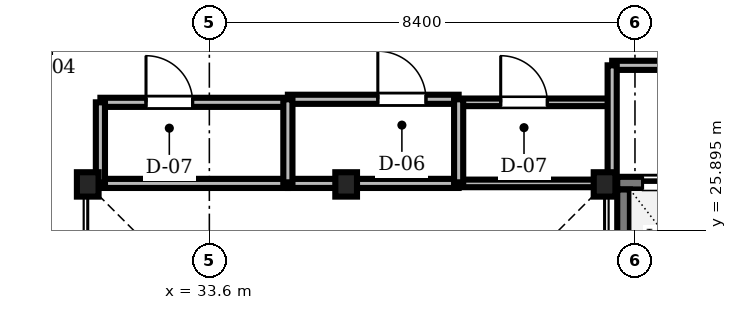
"""IFC4 building model, lengths in metres.
Left out: names, types, materials, properties, quantities, classifications, styles, units other than length and angle.
Written with IfcOpenShell. Run it as: python <this file> out.ifc"""

import sys

from ifc_helpers import new_model, si_unit, direction, frame, frame_2d, origin, origin_2d, place, context, subcontext, project, spatial, rectangle, i_section, extrude, source, transform, mapped, element, fill, save


model = new_model("IFC4")
c1 = context("Model", 3, precision=1e-05, world=origin(), true_north=direction((0.0, 1.0)))
c2 = subcontext(c1, "Body", "Model", "MODEL_VIEW")
j1 = project(units=[si_unit("LENGTHUNIT", "METRE"), si_unit("PLANEANGLEUNIT", "RADIAN")], contexts=[c1])
p1 = place(None, origin())
s1 = spatial("IfcSite", under=j1, at=p1, CompositionType="ELEMENT")
p2 = place(p1, origin())
s2 = spatial("IfcBuilding", under=s1, at=p2, CompositionType="ELEMENT")
p3 = place(p2, frame((0.0, 0.0, 67.75)))
s3 = spatial("IfcBuildingStorey", under=s2, at=p3, CompositionType="ELEMENT", Elevation=67.75)
m1 = source(origin(), c2, "Body", "SweptSolid", [
    extrude(i_section(OverallWidth=0.428, OverallDepth=0.481, WebThickness=0.04, FlangeThickness=0.063, FilletRadius=0.015, at=origin_2d()), origin(), (0.0, 0.0, 1.0), 3.41),
])
for number, where, z_axis, x_axis in (
    (1, (41.4, 26.8, 0.0), (0.0, 0.0, 1.0), (1.0, 0.0, 0.0)),
    (2, (36.3, 26.8, 0.0), (0.0, 0.0, 1.0), (1.0, 0.0, 0.0)),
    (3, (31.2, 26.8, 0.0), (0.0, 0.0, 1.0), (1.0, 0.0, 0.0)),
):
    element("IfcColumn", number, at=place(p3, frame(where, z_axis=z_axis, x_axis=x_axis)), inside=s3, PredefinedType="COLUMN", context=c2, shape_type="MappedRepresentation", body=[
        mapped(m1, transform((0.0, 0.0, 0.0), scale=1.0)),
    ])
m2 = source(origin(), c2, "Body", "SweptSolid", [
    extrude(rectangle(XDim=2.3, YDim=0.25, at=frame_2d((1.15, 0.0))), origin(), (0.0, 0.0, 1.0), 3.41),
])
p4 = place(p3, frame((41.65, 26.825, 0.0), z_axis=(0.0, 0.0, 1.0), x_axis=(1.0, 0.0, 0.0)))
e4 = element("IfcWall", 4, at=p4, inside=s3, PredefinedType="SOLIDWALL", context=c2, shape_type="MappedRepresentation", body=[
    mapped(m2, transform((0.0, 0.0, 0.0), scale=1.0)),
])
m3 = source(origin(), c2, "Body", "SweptSolid", [
    extrude(rectangle(XDim=1.3, YDim=2.3, at=frame_2d((0.65, 1.15))), frame((0.0, 0.135, 0.0), z_axis=(0.0, -1.0, 0.0), x_axis=(1.0, 0.0, 0.0)), (0.0, 0.0, 1.0), 0.27),
])
p5 = place(p4, frame((0.5, 0.0, 0.0)))
e5 = element("IfcOpeningElement", 5, at=p5, cuts=e4, PredefinedType="OPENING", context=c2, shape_type="MappedRepresentation", body=[
    mapped(m3, transform((0.0, 0.0, 0.0), scale=1.0)),
])
p6 = place(p3, frame((41.775, 24.4, 0.0), z_axis=(0.0, 0.0, 1.0), x_axis=(0.0, 1.0, 0.0)))
e6 = element("IfcWall", 6, at=p6, inside=s3, PredefinedType="SOLIDWALL", context=c2, shape_type="MappedRepresentation", body=[
    mapped(m2, transform((0.0, 0.0, 0.0), scale=1.0)),
])
m4 = source(origin(), c2, "Body", "SweptSolid", [
    extrude(rectangle(XDim=4.448, YDim=0.18, at=frame_2d((2.224, 0.0))), origin(), (0.0, 0.0, 1.0), 3.042),
])
p7 = place(p3, frame((41.55, 29.15, 0.0), z_axis=(0.0, 0.0, 1.0), x_axis=(1.0, 0.0, 0.0)))
e7 = element("IfcWall", 7, at=p7, inside=s3, PredefinedType="PARTITIONING", context=c2, shape_type="MappedRepresentation", body=[
    mapped(m4, transform((0.0, 0.0, 0.0), scale=1.0)),
])
m5 = source(origin(), c2, "Body", "SweptSolid", [
    extrude(rectangle(XDim=1.2, YDim=2.2, at=frame_2d((0.6, 1.1))), frame((0.0, 0.1, 0.0), z_axis=(0.0, -1.0, 0.0), x_axis=(1.0, 0.0, 0.0)), (0.0, 0.0, 1.0), 0.2),
])
p8 = place(p7, frame((1.6, 0.0, 0.0)))
e8 = element("IfcOpeningElement", 8, at=p8, cuts=e7, PredefinedType="OPENING", context=c2, shape_type="MappedRepresentation", body=[
    mapped(m5, transform((0.0, 0.0, 0.0), scale=1.0)),
])
m6 = source(origin(), c2, "Body", "SweptSolid", [
    extrude(rectangle(XDim=3.7, YDim=0.18, at=frame_2d((1.85, 0.0))), origin(), (0.0, 0.0, 1.0), 3.042),
])
p9 = place(p3, frame((31.45, 28.42, 0.0), z_axis=(0.0, 0.0, 1.0), x_axis=(1.0, 0.0, 0.0)))
e9 = element("IfcWall", 9, at=p9, inside=s3, PredefinedType="PARTITIONING", context=c2, shape_type="MappedRepresentation", body=[
    mapped(m6, transform((0.0, 0.0, 0.0), scale=1.0)),
])
m7 = source(origin(), c2, "Body", "SweptSolid", [
    extrude(rectangle(XDim=0.92, YDim=2.1, at=frame_2d((0.46, 1.05))), frame((0.0, 0.1, 0.0), z_axis=(0.0, -1.0, 0.0), x_axis=(1.0, 0.0, 0.0)), (0.0, 0.0, 1.0), 0.2),
])
p10 = place(p9, frame((0.9, 0.0, 0.0)))
e10 = element("IfcOpeningElement", 10, at=p10, cuts=e9, PredefinedType="OPENING", context=c2, shape_type="MappedRepresentation", body=[
    mapped(m7, transform((0.0, 0.0, 0.0), scale=1.0)),
])
m8 = source(origin(), c2, "Body", "SweptSolid", [
    extrude(rectangle(XDim=3.37, YDim=0.18, at=frame_2d((1.685, 0.0))), origin(), (0.0, 0.0, 1.0), 3.41),
])
p11 = place(p3, frame((35.15, 28.48, 0.0), z_axis=(0.0, 0.0, 1.0), x_axis=(1.0, 0.0, 0.0)))
e11 = element("IfcWall", 11, at=p11, inside=s3, PredefinedType="PARTITIONING", context=c2, shape_type="MappedRepresentation", body=[
    mapped(m8, transform((0.0, 0.0, 0.0), scale=1.0)),
])
m9 = source(origin(), c2, "Body", "SweptSolid", [
    extrude(rectangle(XDim=0.95, YDim=2.15, at=frame_2d((0.475, 1.075))), frame((0.0, 0.1, 0.0), z_axis=(0.0, -1.0, 0.0), x_axis=(1.0, 0.0, 0.0)), (0.0, 0.0, 1.0), 0.2),
])
p12 = place(p11, frame((1.775, 0.0, 0.0)))
e12 = element("IfcOpeningElement", 12, at=p12, cuts=e11, PredefinedType="OPENING", context=c2, shape_type="MappedRepresentation", body=[
    mapped(m9, transform((0.0, 0.0, 0.0), scale=1.0)),
])
m10 = source(origin(), c2, "Body", "SweptSolid", [
    extrude(rectangle(XDim=3.0, YDim=0.15, at=frame_2d((1.5, 0.0))), origin(), (0.0, 0.0, 1.0), 3.41),
])
p13 = place(p3, frame((38.52, 28.42, 0.0), z_axis=(0.0, 0.0, 1.0), x_axis=(1.0, 0.0, 0.0)))
e13 = element("IfcWall", 13, at=p13, inside=s3, PredefinedType="PARTITIONING", context=c2, shape_type="MappedRepresentation", body=[
    mapped(m10, transform((0.0, 0.0, 0.0), scale=1.0)),
])
m11 = source(origin(), c2, "Body", "SweptSolid", [
    extrude(rectangle(XDim=0.92, YDim=2.1, at=frame_2d((0.46, 1.05))), frame((0.0, 0.085, 0.0), z_axis=(0.0, -1.0, 0.0), x_axis=(1.0, 0.0, 0.0)), (0.0, 0.0, 1.0), 0.17),
])
p14 = place(p13, frame((0.83, 0.0, 0.0)))
e14 = element("IfcOpeningElement", 14, at=p14, cuts=e13, PredefinedType="OPENING", context=c2, shape_type="MappedRepresentation", body=[
    mapped(m11, transform((0.0, 0.0, 0.0), scale=1.0)),
])
m12 = source(origin(), c2, "Body", "SweptSolid", [
    extrude(rectangle(XDim=3.7, YDim=0.18, at=frame_2d((1.85, 0.0))), origin(), (0.0, 0.0, 1.0), 2.952),
])
p15 = place(p3, frame((31.45, 26.82, 0.0), z_axis=(0.0, 0.0, 1.0), x_axis=(1.0, 0.0, 0.0)))
e15 = element("IfcWall", 15, at=p15, inside=s3, PredefinedType="PARTITIONING", context=c2, shape_type="MappedRepresentation", body=[
    mapped(m12, transform((0.0, 0.0, 0.0), scale=1.0)),
])
m13 = source(origin(), c2, "Body", "SweptSolid", [
    extrude(rectangle(XDim=3.37, YDim=0.18, at=frame_2d((1.685, 0.0))), origin(), (0.0, 0.0, 1.0), 2.952),
])
p16 = place(p3, frame((35.15, 26.82, 0.0), z_axis=(0.0, 0.0, 1.0), x_axis=(1.0, 0.0, 0.0)))
e16 = element("IfcWall", 16, at=p16, inside=s3, PredefinedType="PARTITIONING", context=c2, shape_type="MappedRepresentation", body=[
    mapped(m13, transform((0.0, 0.0, 0.0), scale=1.0)),
])
m14 = source(origin(), c2, "Body", "SweptSolid", [
    extrude(rectangle(XDim=3.0, YDim=0.15, at=frame_2d((1.5, 0.0))), origin(), (0.0, 0.0, 1.0), 2.802),
])
p17 = place(p3, frame((38.52, 26.82, 0.0), z_axis=(0.0, 0.0, 1.0), x_axis=(1.0, 0.0, 0.0)))
e17 = element("IfcWall", 17, at=p17, inside=s3, PredefinedType="PARTITIONING", context=c2, shape_type="MappedRepresentation", body=[
    mapped(m14, transform((0.0, 0.0, 0.0), scale=1.0)),
])
m15 = source(origin(), c2, "Body", "SweptSolid", [
    extrude(rectangle(XDim=2.35, YDim=0.18, at=frame_2d((1.175, 0.0))), origin(), (0.0, 0.0, 1.0), 2.802),
])
p18 = place(p3, frame((41.55, 26.8, 0.0), z_axis=(0.0, 0.0, 1.0), x_axis=(0.0, 1.0, 0.0)))
e18 = element("IfcWall", 18, at=p18, inside=s3, PredefinedType="PARTITIONING", context=c2, shape_type="MappedRepresentation", body=[
    mapped(m15, transform((0.0, 0.0, 0.0), scale=1.0)),
])
m16 = source(origin(), c2, "Body", "SweptSolid", [
    extrude(rectangle(XDim=1.66, YDim=0.18, at=frame_2d((0.83, 0.0))), origin(), (0.0, 0.0, 1.0), 2.952),
])
for number, where, z_axis, x_axis in (
    (19, (35.15, 26.82, 0.0), (0.0, 0.0, 1.0), (0.0, 1.0, 0.0)),
    (20, (38.52, 26.82, 0.0), (0.0, 0.0, 1.0), (0.0, 1.0, 0.0)),
):
    element("IfcWall", number, at=place(p3, frame(where, z_axis=z_axis, x_axis=x_axis)), inside=s3, PredefinedType="PARTITIONING", context=c2, shape_type="MappedRepresentation", body=[
        mapped(m16, transform((0.0, 0.0, 0.0), scale=1.0)),
    ])
m17 = source(origin(), c2, "Body", "SweptSolid", [
    extrude(rectangle(XDim=1.6, YDim=0.18, at=frame_2d((0.8, 0.0))), origin(), (0.0, 0.0, 1.0), 2.952),
])
p19 = place(p3, frame((31.45, 26.82, 0.0), z_axis=(0.0, 0.0, 1.0), x_axis=(0.0, 1.0, 0.0)))
e21 = element("IfcWall", 21, at=p19, inside=s3, PredefinedType="PARTITIONING", context=c2, shape_type="MappedRepresentation", body=[
    mapped(m17, transform((0.0, 0.0, 0.0), scale=1.0)),
])
m18 = source(origin(), c2, "Body", "SweptSolid", [
    extrude(rectangle(XDim=1.3, YDim=2.3, at=frame_2d((0.65, 1.15))), frame((0.0, 0.025, 0.0), z_axis=(0.0, -1.0, 0.0), x_axis=(1.0, 0.0, 0.0)), (0.0, 0.0, 1.0), 0.05),
])
p20 = place(p5, origin())
e22 = element("IfcDoor", 22, at=p20, inside=s3, OperationType="DOUBLE_DOOR_SLIDING", PredefinedType="DOOR", context=c2, shape_type="MappedRepresentation", body=[
    mapped(m18, transform((0.0, 0.0, 0.0), scale=1.0)),
])
fill(e5, e22)
m19 = source(origin(), c2, "Body", "SweptSolid", [
    extrude(rectangle(XDim=0.92, YDim=2.1, at=frame_2d((0.46, 1.05))), frame((0.0, 0.025, 0.0), z_axis=(0.0, -1.0, 0.0), x_axis=(1.0, 0.0, 0.0)), (0.0, 0.0, 1.0), 0.05),
])
p21 = place(p10, origin())
e23 = element("IfcDoor", 23, at=p21, inside=s3, OperationType="SINGLE_SWING_LEFT", PredefinedType="DOOR", context=c2, shape_type="MappedRepresentation", body=[
    mapped(m19, transform((0.0, 0.0, 0.0), scale=1.0)),
])
fill(e10, e23)
m20 = source(origin(), c2, "Body", "SweptSolid", [
    extrude(rectangle(XDim=0.95, YDim=2.15, at=frame_2d((0.475, 1.075))), frame((0.0, 0.025, 0.0), z_axis=(0.0, -1.0, 0.0), x_axis=(1.0, 0.0, 0.0)), (0.0, 0.0, 1.0), 0.05),
])
p22 = place(p12, origin())
e24 = element("IfcDoor", 24, at=p22, inside=s3, OperationType="SINGLE_SWING_LEFT", PredefinedType="DOOR", context=c2, shape_type="MappedRepresentation", body=[
    mapped(m20, transform((0.0, 0.0, 0.0), scale=1.0)),
])
fill(e12, e24)
p23 = place(p14, origin())
e25 = element("IfcDoor", 25, at=p23, inside=s3, OperationType="SINGLE_SWING_LEFT", PredefinedType="DOOR", context=c2, shape_type="MappedRepresentation", body=[
    mapped(m19, transform((0.0, 0.0, 0.0), scale=1.0)),
])
fill(e14, e25)
save(model, sys.argv[1])
